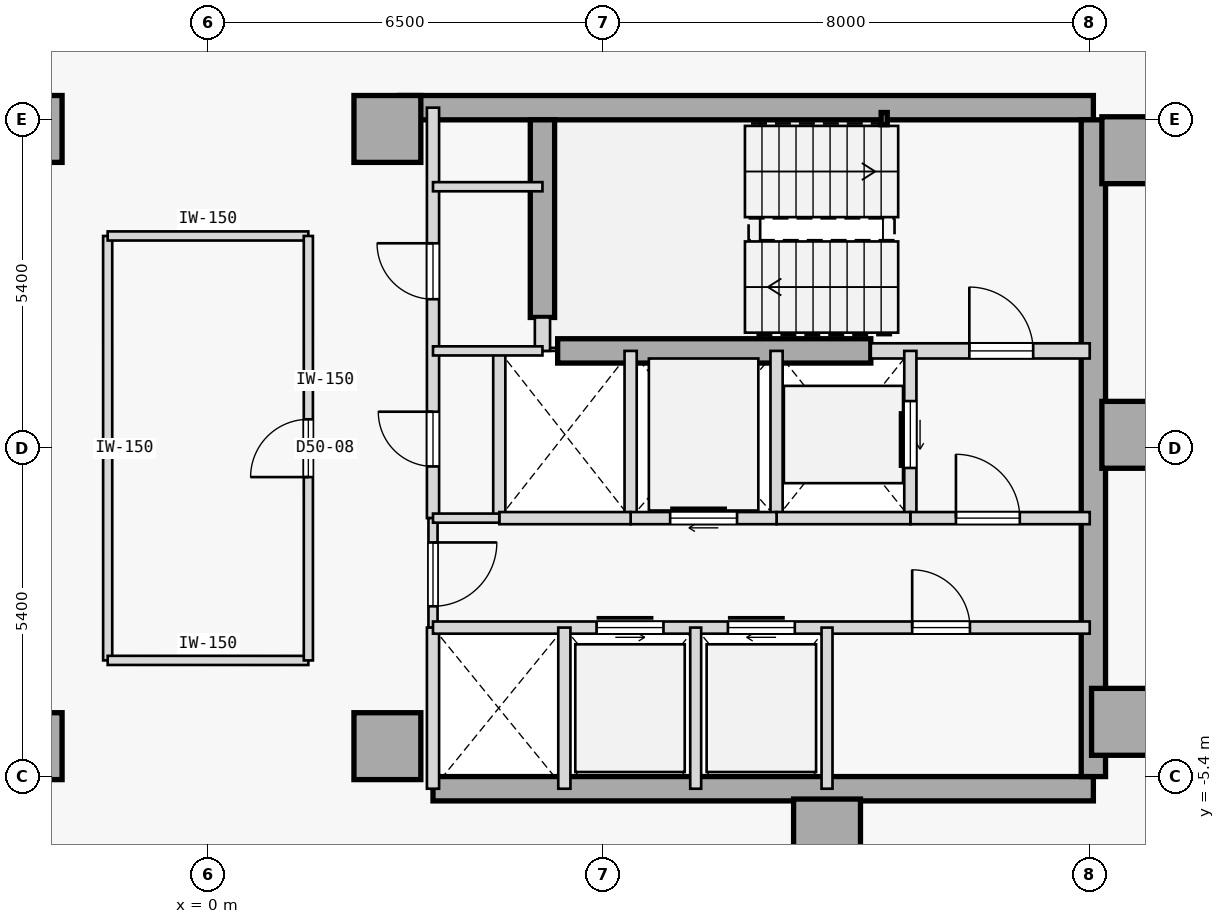
"""IFC4 building model, lengths in metres.
Left out: names, types, materials, properties, quantities, classifications, styles, units other than length and angle.
Written with IfcOpenShell. Run it as: python <this file> out.ifc"""

import sys

from ifc_helpers import new_model, si_unit, direction, frame, frame_2d, origin, origin_2d, place, context, subcontext, project, spatial, rectangle, hollow_rectangle, extrude, element, fill, save


model = new_model("IFC4")
c1 = context("Model", 3, precision=1e-05, world=origin(), true_north=direction((0.0, 1.0)))
c2 = subcontext(c1, "Body", "Model", "MODEL_VIEW")
j1 = project(units=[si_unit("LENGTHUNIT", "METRE"), si_unit("PLANEANGLEUNIT", "RADIAN")], contexts=[c1])
p1 = place(None, origin())
s1 = spatial("IfcSite", under=j1, at=p1, CompositionType="ELEMENT")
p2 = place(p1, origin())
s2 = spatial("IfcBuilding", under=s1, at=p2, CompositionType="ELEMENT")
p3 = place(p2, frame((0.0, 0.0, 192.2)))
s3 = spatial("IfcBuildingStorey", under=s2, at=p3, CompositionType="ELEMENT", Elevation=192.2)
for number, where, z_axis, x_axis in (
    (1, (-2.95, -4.9, 0.0), (0.0, 0.0, 1.0), (1.0, 0.0, 0.0)),
    (2, (-2.95, 5.25, 0.0), (0.0, 0.0, 1.0), (1.0, 0.0, 0.0)),
    (3, (15.25, 4.9, 0.0), (0.0, 0.0, 1.0), (1.0, 0.0, 0.0)),
    (4, (15.25, 0.22, 0.0), (0.0, 0.0, 1.0), (1.0, 0.0, 0.0)),
    (5, (15.08, -4.5, 0.0), (0.0, 0.0, 1.0), (1.0, 0.0, 0.0)),
    (6, (10.18, -6.32, 0.0), (0.0, 0.0, 1.0), (1.0, 0.0, 0.0)),
    (7, (2.95, -4.9, 0.0), (0.0, 0.0, 1.0), (1.0, 0.0, 0.0)),
    (8, (2.95, 5.25, 0.0), (0.0, 0.0, 1.0), (1.0, 0.0, 0.0)),
):
    element("IfcColumn", number, at=place(p3, frame(where, z_axis=z_axis, x_axis=x_axis)), inside=s3, PredefinedType="COLUMN", context=c2, shape_type="SweptSolid", body=[
        extrude(rectangle(XDim=1.1, YDim=1.1, at=origin_2d()), origin(), (0.0, 0.0, 1.0), 3.4),
    ])
p4 = place(p3, frame((3.15, 5.6, 0.0), z_axis=(0.0, 0.0, 1.0), x_axis=(1.0, 0.0, 0.0)))
e9 = element("IfcWall", 9, at=p4, inside=s3, PredefinedType="SHEAR", context=c2, shape_type="SweptSolid", body=[
    extrude(rectangle(XDim=11.41, YDim=0.4, at=frame_2d((5.705, 0.0))), origin(), (0.0, 0.0, 1.0), 3.175),
])
p5 = place(p3, frame((3.7, -5.6, 0.0), z_axis=(0.0, 0.0, 1.0), x_axis=(1.0, 0.0, 0.0)))
e10 = element("IfcWall", 10, at=p5, inside=s3, PredefinedType="SHEAR", context=c2, shape_type="SweptSolid", body=[
    extrude(rectangle(XDim=10.86, YDim=0.4, at=frame_2d((5.43, 0.0))), origin(), (0.0, 0.0, 1.0), 3.175),
])
p6 = place(p3, frame((14.56, -5.4, 0.0), z_axis=(0.0, 0.0, 1.0), x_axis=(0.0, 1.0, 0.0)))
e11 = element("IfcWall", 11, at=p6, inside=s3, PredefinedType="SHEAR", context=c2, shape_type="SweptSolid", body=[
    extrude(rectangle(XDim=10.8, YDim=0.4, at=frame_2d((5.4, 0.0))), origin(), (0.0, 0.0, 1.0), 3.175),
])
p7 = place(p3, frame((5.5, 2.15, 0.0), z_axis=(0.0, 0.0, 1.0), x_axis=(0.0, 1.0, 0.0)))
e12 = element("IfcWall", 12, at=p7, inside=s3, PredefinedType="SHEAR", context=c2, shape_type="SweptSolid", body=[
    extrude(rectangle(XDim=3.25, YDim=0.4, at=frame_2d((1.625, 0.0))), origin(), (0.0, 0.0, 1.0), 3.175),
])
p8 = place(p3, frame((5.75, 1.6, 0.0), z_axis=(0.0, 0.0, 1.0), x_axis=(1.0, 0.0, 0.0)))
e13 = element("IfcWall", 13, at=p8, inside=s3, PredefinedType="SHEAR", context=c2, shape_type="SweptSolid", body=[
    extrude(rectangle(XDim=5.15, YDim=0.4, at=frame_2d((2.575, 0.0))), origin(), (0.0, 0.0, 1.0), 3.175),
])
p9 = place(p3, frame((11.12, 5.42, 0.0), z_axis=(0.0, 0.0, 1.0), x_axis=(1.0, 0.0, 0.0)))
e14 = element("IfcColumn", 14, at=p9, inside=s3, PredefinedType="COLUMN", context=c2, shape_type="SweptSolid", body=[
    extrude(hollow_rectangle(XDim=0.1, YDim=0.2, WallThickness=0.008, at=origin_2d()), origin(), (0.0, 0.0, 1.0), 3.4),
])
p10 = place(p3, frame((10.9, 1.6, 0.0), z_axis=(0.0, 0.0, 1.0), x_axis=(1.0, 0.0, 0.0)))
e15 = element("IfcWall", 15, at=p10, inside=s3, PredefinedType="STANDARD", context=c2, shape_type="SweptSolid", body=[
    extrude(rectangle(XDim=3.6, YDim=0.25, at=frame_2d((1.8, 0.0))), origin(), (0.0, 0.0, 1.0), 3.175),
])
p11 = place(p10, frame((1.62, 0.0, 0.0)))
e16 = element("IfcOpeningElement", 16, at=p11, cuts=e15, PredefinedType="OPENING", context=c2, shape_type="SweptSolid", body=[
    extrude(rectangle(XDim=1.05, YDim=2.15, at=frame_2d((0.525, 1.075))), frame((0.0, 0.135, 0.0), z_axis=(0.0, -1.0, 0.0), x_axis=(1.0, 0.0, 0.0)), (0.0, 0.0, 1.0), 0.27),
])
p12 = place(p3, frame((5.5, 1.6, 0.0), z_axis=(0.0, 0.0, 1.0), x_axis=(0.0, 1.0, 0.0)))
e17 = element("IfcWall", 17, at=p12, inside=s3, PredefinedType="STANDARD", context=c2, shape_type="SweptSolid", body=[
    extrude(rectangle(XDim=0.55, YDim=0.25, at=frame_2d((0.275, 0.0))), origin(), (0.0, 0.0, 1.0), 3.175),
])
p13 = place(p3, frame((3.7, -1.15, 0.0), z_axis=(0.0, 0.0, 1.0), x_axis=(0.0, 1.0, 0.0)))
e18 = element("IfcWall", 18, at=p13, inside=s3, PredefinedType="STANDARD", context=c2, shape_type="SweptSolid", body=[
    extrude(rectangle(XDim=6.75, YDim=0.2, at=frame_2d((3.375, 0.0))), origin(), (0.0, 0.0, 1.0), 3.175),
])
p14 = place(p13, frame((3.6, 0.0, 0.0)))
e19 = element("IfcOpeningElement", 19, at=p14, cuts=e18, PredefinedType="OPENING", context=c2, shape_type="SweptSolid", body=[
    extrude(rectangle(XDim=0.92, YDim=2.15, at=frame_2d((0.46, 1.075))), frame((0.0, 0.11, 0.0), z_axis=(0.0, -1.0, 0.0), x_axis=(1.0, 0.0, 0.0)), (0.0, 0.0, 1.0), 0.22),
])
p15 = place(p13, frame((0.85, 0.0, 0.0)))
e20 = element("IfcOpeningElement", 20, at=p15, cuts=e18, PredefinedType="OPENING", context=c2, shape_type="SweptSolid", body=[
    extrude(rectangle(XDim=0.9, YDim=2.15, at=frame_2d((0.45, 1.075))), frame((0.0, 0.11, 0.0), z_axis=(0.0, -1.0, 0.0), x_axis=(1.0, 0.0, 0.0)), (0.0, 0.0, 1.0), 0.22),
])
p16 = place(p3, frame((3.7, -2.95, 0.0), z_axis=(0.0, 0.0, 1.0), x_axis=(0.0, 1.0, 0.0)))
e21 = element("IfcWall", 21, at=p16, inside=s3, PredefinedType="PARTITIONING", context=c2, shape_type="SweptSolid", body=[
    extrude(rectangle(XDim=1.8, YDim=0.15, at=frame_2d((0.9, 0.0))), origin(), (0.0, 0.0, 1.0), 3.175),
])
p17 = place(p16, frame((0.35, 0.0, 0.0)))
e22 = element("IfcOpeningElement", 22, at=p17, cuts=e21, PredefinedType="OPENING", context=c2, shape_type="SweptSolid", body=[
    extrude(rectangle(XDim=1.05, YDim=2.18, at=frame_2d((0.525, 1.09))), frame((0.0, 0.085, 0.0), z_axis=(0.0, -1.0, 0.0), x_axis=(1.0, 0.0, 0.0)), (0.0, 0.0, 1.0), 0.17),
])
p18 = place(p3, frame((3.7, -5.6, 0.0), z_axis=(0.0, 0.0, 1.0), x_axis=(0.0, 1.0, 0.0)))
e23 = element("IfcWall", 23, at=p18, inside=s3, PredefinedType="STANDARD", context=c2, shape_type="SweptSolid", body=[
    extrude(rectangle(XDim=2.65, YDim=0.2, at=frame_2d((1.325, 0.0))), origin(), (0.0, 0.0, 1.0), 3.175),
])
p19 = place(p3, frame((11.55, -1.15, 0.0), z_axis=(0.0, 0.0, 1.0), x_axis=(0.0, 1.0, 0.0)))
e24 = element("IfcWall", 24, at=p19, inside=s3, PredefinedType="STANDARD", context=c2, shape_type="SweptSolid", body=[
    extrude(rectangle(XDim=2.75, YDim=0.2, at=frame_2d((1.375, 0.0))), origin(), (0.0, 0.0, 1.0), 3.175),
])
p20 = place(p19, frame((0.825, 0.0, 0.0)))
e25 = element("IfcOpeningElement", 25, at=p20, cuts=e24, PredefinedType="OPENING", context=c2, shape_type="SweptSolid", body=[
    extrude(rectangle(XDim=1.1, YDim=2.15, at=frame_2d((0.55, 1.075))), frame((0.0, 0.11, 0.0), z_axis=(0.0, -1.0, 0.0), x_axis=(1.0, 0.0, 0.0)), (0.0, 0.0, 1.0), 0.22),
])
p21 = place(p3, frame((9.35, -1.15, 0.0), z_axis=(0.0, 0.0, 1.0), x_axis=(0.0, 1.0, 0.0)))
e26 = element("IfcWall", 26, at=p21, inside=s3, PredefinedType="STANDARD", context=c2, shape_type="SweptSolid", body=[
    extrude(rectangle(XDim=2.75, YDim=0.2, at=frame_2d((1.375, 0.0))), origin(), (0.0, 0.0, 1.0), 3.175),
])
p22 = place(p3, frame((11.55, -1.15, 0.0), z_axis=(0.0, 0.0, 1.0), x_axis=(1.0, 0.0, 0.0)))
e27 = element("IfcWall", 27, at=p22, inside=s3, PredefinedType="STANDARD", context=c2, shape_type="SweptSolid", body=[
    extrude(rectangle(XDim=2.95, YDim=0.2, at=frame_2d((1.475, 0.0))), origin(), (0.0, 0.0, 1.0), 3.175),
])
p23 = place(p22, frame((0.75, 0.0, 0.0)))
e28 = element("IfcOpeningElement", 28, at=p23, cuts=e27, PredefinedType="OPENING", context=c2, shape_type="SweptSolid", body=[
    extrude(rectangle(XDim=1.05, YDim=2.18, at=frame_2d((0.525, 1.09))), frame((0.0, 0.11, 0.0), z_axis=(0.0, -1.0, 0.0), x_axis=(1.0, 0.0, 0.0)), (0.0, 0.0, 1.0), 0.22),
])
p24 = place(p3, frame((9.35, -1.15, 0.0), z_axis=(0.0, 0.0, 1.0), x_axis=(1.0, 0.0, 0.0)))
e29 = element("IfcWall", 29, at=p24, inside=s3, PredefinedType="STANDARD", context=c2, shape_type="SweptSolid", body=[
    extrude(rectangle(XDim=2.2, YDim=0.2, at=frame_2d((1.1, 0.0))), origin(), (0.0, 0.0, 1.0), 3.175),
])
p25 = place(p3, frame((6.95, -1.15, 0.0), z_axis=(0.0, 0.0, 1.0), x_axis=(0.0, 1.0, 0.0)))
e30 = element("IfcWall", 30, at=p25, inside=s3, PredefinedType="STANDARD", context=c2, shape_type="SweptSolid", body=[
    extrude(rectangle(XDim=2.75, YDim=0.2, at=frame_2d((1.375, 0.0))), origin(), (0.0, 0.0, 1.0), 3.175),
])
p26 = place(p3, frame((6.95, -1.15, 0.0), z_axis=(0.0, 0.0, 1.0), x_axis=(1.0, 0.0, 0.0)))
e31 = element("IfcWall", 31, at=p26, inside=s3, PredefinedType="STANDARD", context=c2, shape_type="SweptSolid", body=[
    extrude(rectangle(XDim=2.4, YDim=0.2, at=frame_2d((1.2, 0.0))), origin(), (0.0, 0.0, 1.0), 3.175),
])
p27 = place(p26, frame((0.65, 0.0, 0.0)))
e32 = element("IfcOpeningElement", 32, at=p27, cuts=e31, PredefinedType="OPENING", context=c2, shape_type="SweptSolid", body=[
    extrude(rectangle(XDim=1.1, YDim=2.15, at=frame_2d((0.55, 1.075))), frame((0.0, 0.11, 0.0), z_axis=(0.0, -1.0, 0.0), x_axis=(1.0, 0.0, 0.0)), (0.0, 0.0, 1.0), 0.22),
])
p28 = place(p3, frame((4.79, -1.15, 0.0), z_axis=(0.0, 0.0, 1.0), x_axis=(0.0, 1.0, 0.0)))
e33 = element("IfcWall", 33, at=p28, inside=s3, PredefinedType="STANDARD", context=c2, shape_type="SweptSolid", body=[
    extrude(rectangle(XDim=2.75, YDim=0.2, at=frame_2d((1.375, 0.0))), origin(), (0.0, 0.0, 1.0), 3.175),
])
p29 = place(p3, frame((4.79, -1.15, 0.0), z_axis=(0.0, 0.0, 1.0), x_axis=(1.0, 0.0, 0.0)))
e34 = element("IfcWall", 34, at=p29, inside=s3, PredefinedType="STANDARD", context=c2, shape_type="SweptSolid", body=[
    extrude(rectangle(XDim=2.16, YDim=0.2, at=frame_2d((1.08, 0.0))), origin(), (0.0, 0.0, 1.0), 3.175),
])
p30 = place(p3, frame((3.7, -1.15, 0.0), z_axis=(0.0, 0.0, 1.0), x_axis=(1.0, 0.0, 0.0)))
e35 = element("IfcWall", 35, at=p30, inside=s3, PredefinedType="PARTITIONING", context=c2, shape_type="SweptSolid", body=[
    extrude(rectangle(XDim=1.09, YDim=0.15, at=frame_2d((0.545, 0.0))), origin(), (0.0, 0.0, 1.0), 3.175),
])
p31 = place(p3, frame((3.7, -2.95, 0.0), z_axis=(0.0, 0.0, 1.0), x_axis=(1.0, 0.0, 0.0)))
e36 = element("IfcWall", 36, at=p31, inside=s3, PredefinedType="STANDARD", context=c2, shape_type="SweptSolid", body=[
    extrude(rectangle(XDim=10.8, YDim=0.2, at=frame_2d((5.4, 0.0))), origin(), (0.0, 0.0, 1.0), 3.175),
])
p32 = place(p31, frame((2.69, 0.0, 0.0)))
e37 = element("IfcOpeningElement", 37, at=p32, cuts=e36, PredefinedType="OPENING", context=c2, shape_type="SweptSolid", body=[
    extrude(rectangle(XDim=1.1, YDim=2.15, at=frame_2d((0.55, 1.075))), frame((0.0, 0.11, 0.0), z_axis=(0.0, -1.0, 0.0), x_axis=(1.0, 0.0, 0.0)), (0.0, 0.0, 1.0), 0.22),
])
p33 = place(p31, frame((4.85, 0.0, 0.0)))
e38 = element("IfcOpeningElement", 38, at=p33, cuts=e36, PredefinedType="OPENING", context=c2, shape_type="SweptSolid", body=[
    extrude(rectangle(XDim=1.1, YDim=2.15, at=frame_2d((0.55, 1.075))), frame((0.0, 0.11, 0.0), z_axis=(0.0, -1.0, 0.0), x_axis=(1.0, 0.0, 0.0)), (0.0, 0.0, 1.0), 0.22),
])
p34 = place(p31, frame((7.88, 0.0, 0.0)))
e39 = element("IfcOpeningElement", 39, at=p34, cuts=e36, PredefinedType="OPENING", context=c2, shape_type="SweptSolid", body=[
    extrude(rectangle(XDim=0.95, YDim=2.15, at=frame_2d((0.475, 1.075))), frame((0.0, 0.11, 0.0), z_axis=(0.0, -1.0, 0.0), x_axis=(1.0, 0.0, 0.0)), (0.0, 0.0, 1.0), 0.22),
])
p35 = place(p3, frame((5.86, -5.6, 0.0), z_axis=(0.0, 0.0, 1.0), x_axis=(0.0, 1.0, 0.0)))
e40 = element("IfcWall", 40, at=p35, inside=s3, PredefinedType="STANDARD", context=c2, shape_type="SweptSolid", body=[
    extrude(rectangle(XDim=2.65, YDim=0.2, at=frame_2d((1.325, 0.0))), origin(), (0.0, 0.0, 1.0), 3.175),
])
for number, where, z_axis, x_axis in (
    (41, (10.18, -5.6, 0.0), (0.0, 0.0, 1.0), (0.0, 1.0, 0.0)),
    (42, (8.02, -5.6, 0.0), (0.0, 0.0, 1.0), (0.0, 1.0, 0.0)),
):
    element("IfcWall", number, at=place(p3, frame(where, z_axis=z_axis, x_axis=x_axis)), inside=s3, PredefinedType="STANDARD", context=c2, shape_type="SweptSolid", body=[
        extrude(rectangle(XDim=2.65, YDim=0.18, at=frame_2d((1.325, 0.0))), origin(), (0.0, 0.0, 1.0), 3.175),
    ])
for number, where, z_axis, x_axis in (
    (43, (3.7, 4.3, 0.0), (0.0, 0.0, 1.0), (1.0, 0.0, 0.0)),
    (44, (3.7, 1.6, 0.0), (0.0, 0.0, 1.0), (1.0, 0.0, 0.0)),
):
    element("IfcWall", number, at=place(p3, frame(where, z_axis=z_axis, x_axis=x_axis)), inside=s3, PredefinedType="PARTITIONING", context=c2, shape_type="SweptSolid", body=[
        extrude(rectangle(XDim=1.8, YDim=0.15, at=frame_2d((0.9, 0.0))), origin(), (0.0, 0.0, 1.0), 3.175),
    ])
p36 = place(p3, frame((-1.65, -3.49, 0.0), z_axis=(0.0, 0.0, 1.0), x_axis=(-3.4979712e-05, 0.999999999388, 0.0)))
e45 = element("IfcWall", 45, at=p36, inside=s3, PredefinedType="PARTITIONING", context=c2, shape_type="SweptSolid", body=[
    extrude(rectangle(XDim=6.979, YDim=0.15, at=frame_2d((3.49, 0.0))), origin(), (0.0, 0.0, 1.0), 3.175),
])
p37 = place(p3, frame((-1.65, -3.49, 0.0), z_axis=(0.0, 0.0, 1.0), x_axis=(0.999999975374, -0.000221926315, 0.0)))
e46 = element("IfcWall", 46, at=p37, inside=s3, PredefinedType="PARTITIONING", context=c2, shape_type="SweptSolid", body=[
    extrude(rectangle(XDim=3.3, YDim=0.15, at=frame_2d((1.65, 0.0))), origin(), (0.0, 0.0, 1.0), 3.175),
])
p38 = place(p3, frame((-1.65, 3.49, 0.0), z_axis=(0.0, 0.0, 1.0), x_axis=(1.0, 0.0, 0.0)))
e47 = element("IfcWall", 47, at=p38, inside=s3, PredefinedType="PARTITIONING", context=c2, shape_type="SweptSolid", body=[
    extrude(rectangle(XDim=3.3, YDim=0.15, at=frame_2d((1.65, 0.0))), origin(), (0.0, 0.0, 1.0), 3.175),
])
p39 = place(p3, frame((1.65, -3.49, 0.0), z_axis=(0.0, 0.0, 1.0), x_axis=(-6.9952083e-05, 0.999999997553, 0.0)))
e48 = element("IfcWall", 48, at=p39, inside=s3, PredefinedType="PARTITIONING", context=c2, shape_type="SweptSolid", body=[
    extrude(rectangle(XDim=6.98, YDim=0.15, at=frame_2d((3.49, 0.0))), origin(), (0.0, 0.0, 1.0), 3.175),
])
p40 = place(p39, frame((3.015, 0.0, 0.0)))
e49 = element("IfcOpeningElement", 49, at=p40, cuts=e48, PredefinedType="OPENING", context=c2, shape_type="SweptSolid", body=[
    extrude(rectangle(XDim=0.95, YDim=2.15, at=frame_2d((0.475, 1.075))), frame((0.0, 0.085, 0.0), z_axis=(0.0, -1.0, 0.0), x_axis=(1.0, 0.0, 0.0)), (0.0, 0.0, 1.0), 0.17),
])
p41 = place(p11, origin())
e50 = element("IfcDoor", 50, at=p41, inside=s3, OperationType="SINGLE_SWING_LEFT", PredefinedType="DOOR", context=c2, shape_type="SweptSolid", body=[
    extrude(rectangle(XDim=1.05, YDim=2.15, at=frame_2d((0.525, 1.075))), frame((0.0, 0.025, 0.0), z_axis=(0.0, -1.0, 0.0), x_axis=(1.0, 0.0, 0.0)), (0.0, 0.0, 1.0), 0.05),
])
fill(e16, e50)
p42 = place(p23, origin())
e51 = element("IfcDoor", 51, at=p42, inside=s3, OperationType="SINGLE_SWING_LEFT", PredefinedType="DOOR", context=c2, shape_type="SweptSolid", body=[
    extrude(rectangle(XDim=1.05, YDim=2.18, at=frame_2d((0.525, 1.09))), frame((0.0, 0.025, 0.0), z_axis=(0.0, -1.0, 0.0), x_axis=(1.0, 0.0, 0.0)), (0.0, 0.0, 1.0), 0.05),
])
fill(e28, e51)
p43 = place(p17, frame((1.05, 0.0, 0.0), z_axis=(0.0, 0.0, 1.0), x_axis=(-1.0, 0.0, 0.0)))
e52 = element("IfcDoor", 52, at=p43, inside=s3, OperationType="SINGLE_SWING_RIGHT", PredefinedType="DOOR", context=c2, shape_type="SweptSolid", body=[
    extrude(rectangle(XDim=1.05, YDim=2.18, at=frame_2d((0.525, 1.09))), frame((0.0, 0.025, 0.0), z_axis=(0.0, -1.0, 0.0), x_axis=(1.0, 0.0, 0.0)), (0.0, 0.0, 1.0), 0.05),
])
fill(e22, e52)
p44 = place(p20, origin())
e53 = element("IfcDoor", 53, at=p44, inside=s3, OperationType="SLIDING_TO_RIGHT", PredefinedType="DOOR", context=c2, shape_type="SweptSolid", body=[
    extrude(rectangle(XDim=1.1, YDim=2.15, at=frame_2d((0.55, 1.075))), frame((0.0, 0.025, 0.0), z_axis=(0.0, -1.0, 0.0), x_axis=(1.0, 0.0, 0.0)), (0.0, 0.0, 1.0), 0.05),
])
fill(e25, e53)
p45 = place(p27, origin())
e54 = element("IfcDoor", 54, at=p45, inside=s3, OperationType="SLIDING_TO_RIGHT", PredefinedType="DOOR", context=c2, shape_type="SweptSolid", body=[
    extrude(rectangle(XDim=1.1, YDim=2.15, at=frame_2d((0.55, 1.075))), frame((0.0, 0.025, 0.0), z_axis=(0.0, -1.0, 0.0), x_axis=(1.0, 0.0, 0.0)), (0.0, 0.0, 1.0), 0.05),
])
fill(e32, e54)
p46 = place(p32, origin())
e55 = element("IfcDoor", 55, at=p46, inside=s3, OperationType="SLIDING_TO_LEFT", PredefinedType="DOOR", context=c2, shape_type="SweptSolid", body=[
    extrude(rectangle(XDim=1.1, YDim=2.15, at=frame_2d((0.55, 1.075))), frame((0.0, 0.025, 0.0), z_axis=(0.0, -1.0, 0.0), x_axis=(1.0, 0.0, 0.0)), (0.0, 0.0, 1.0), 0.05),
])
fill(e37, e55)
p47 = place(p33, origin())
e56 = element("IfcDoor", 56, at=p47, inside=s3, OperationType="SLIDING_TO_RIGHT", PredefinedType="DOOR", context=c2, shape_type="SweptSolid", body=[
    extrude(rectangle(XDim=1.1, YDim=2.15, at=frame_2d((0.55, 1.075))), frame((0.0, 0.025, 0.0), z_axis=(0.0, -1.0, 0.0), x_axis=(1.0, 0.0, 0.0)), (0.0, 0.0, 1.0), 0.05),
])
fill(e38, e56)
p48 = place(p34, origin())
e57 = element("IfcDoor", 57, at=p48, inside=s3, OperationType="SINGLE_SWING_LEFT", PredefinedType="DOOR", context=c2, shape_type="SweptSolid", body=[
    extrude(rectangle(XDim=0.95, YDim=2.15, at=frame_2d((0.475, 1.075))), frame((0.0, 0.025, 0.0), z_axis=(0.0, -1.0, 0.0), x_axis=(1.0, 0.0, 0.0)), (0.0, 0.0, 1.0), 0.05),
])
fill(e39, e57)
p49 = place(p14, origin())
e58 = element("IfcDoor", 58, at=p49, inside=s3, OperationType="SINGLE_SWING_RIGHT", PredefinedType="DOOR", context=c2, shape_type="SweptSolid", body=[
    extrude(rectangle(XDim=0.92, YDim=2.15, at=frame_2d((0.46, 1.075))), frame((0.0, 0.025, 0.0), z_axis=(0.0, -1.0, 0.0), x_axis=(1.0, 0.0, 0.0)), (0.0, 0.0, 1.0), 0.05),
])
fill(e19, e58)
p50 = place(p15, origin())
e59 = element("IfcDoor", 59, at=p50, inside=s3, OperationType="SINGLE_SWING_RIGHT", PredefinedType="DOOR", context=c2, shape_type="SweptSolid", body=[
    extrude(rectangle(XDim=0.9, YDim=2.15, at=frame_2d((0.45, 1.075))), frame((0.0, 0.025, 0.0), z_axis=(0.0, -1.0, 0.0), x_axis=(1.0, 0.0, 0.0)), (0.0, 0.0, 1.0), 0.05),
])
fill(e20, e59)
p51 = place(p40, origin())
e60 = element("IfcDoor", 60, at=p51, inside=s3, OperationType="SINGLE_SWING_LEFT", PredefinedType="DOOR", context=c2, shape_type="SweptSolid", body=[
    extrude(rectangle(XDim=0.95, YDim=2.15, at=frame_2d((0.475, 1.075))), frame((0.0, 0.025, 0.0), z_axis=(0.0, -1.0, 0.0), x_axis=(1.0, 0.0, 0.0)), (0.0, 0.0, 1.0), 0.05),
])
fill(e49, e60)
save(model, sys.argv[1])
